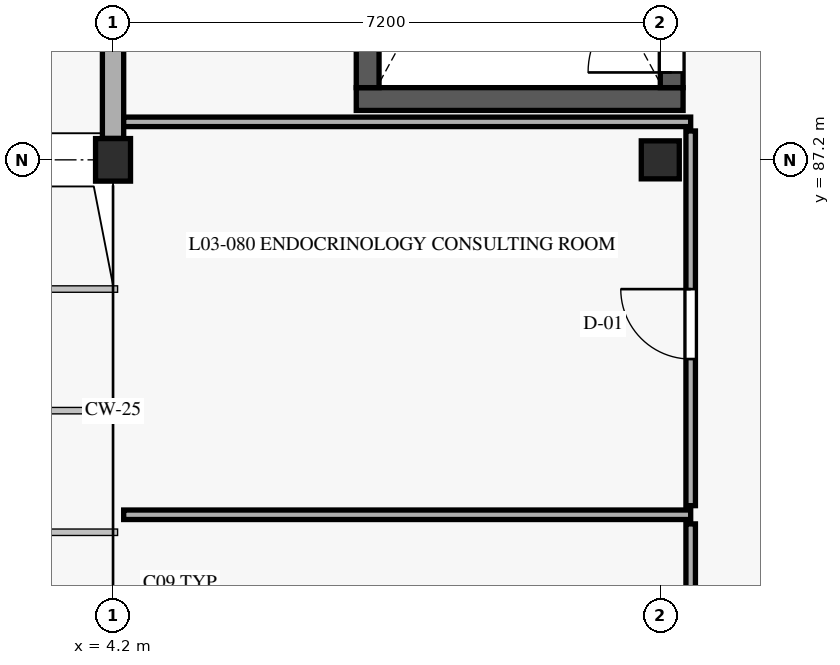
"""IFC4 building model, lengths in metres.
Left out: names, types, materials, properties, quantities, classifications, styles, units other than length and angle.
Written with IfcOpenShell. Run it as: python <this file> out.ifc"""

import sys

from ifc_helpers import new_model, si_unit, direction, frame, frame_2d, origin, origin_with_axes, origin_2d, place, context, subcontext, project, spatial, rectangle, extrude, element, fill, save


model = new_model("IFC4")
c1 = context("Model", 3, precision=1e-05, world=origin(), true_north=direction((0.0, 1.0)))
c2 = subcontext(c1, "Body", "Model", "MODEL_VIEW")
j1 = project(units=[si_unit("LENGTHUNIT", "METRE"), si_unit("PLANEANGLEUNIT", "RADIAN")], contexts=[c1])
p1 = place(None, origin())
s1 = spatial("IfcSite", under=j1, at=p1, CompositionType="ELEMENT")
p2 = place(p1, origin())
s2 = spatial("IfcBuilding", under=s1, at=p2, CompositionType="ELEMENT")
p3 = place(p2, frame((0.0, 0.0, 9.3)))
s3 = spatial("IfcBuildingStorey", under=s2, at=p3, CompositionType="ELEMENT", Elevation=9.3)
p4 = place(p3, frame((4.2, 87.2, 0.0), z_axis=(0.0, 0.0, 1.0), x_axis=(1.0, 0.0, 0.0)))
e1 = element("IfcColumn", 1, at=p4, inside=s3, PredefinedType="COLUMN", context=c2, shape_type="SweptSolid", body=[
    extrude(rectangle(XDim=0.46, YDim=0.56, at=origin_2d()), origin(), (0.0, 0.0, 1.0), 4.2),
])
p5 = place(p3, frame((11.4, 87.2, 0.0), z_axis=(0.0, 0.0, 1.0), x_axis=(1.0, 0.0, 0.0)))
e2 = element("IfcColumn", 2, at=p5, inside=s3, PredefinedType="COLUMN", context=c2, shape_type="SweptSolid", body=[
    extrude(rectangle(XDim=0.5, YDim=0.5, at=origin_2d()), origin(), (0.0, 0.0, 1.0), 4.2),
])
p6 = place(p3, frame((7.4, 88.0, 0.0), z_axis=(0.0, 0.0, 1.0), x_axis=(1.0, 0.0, 0.0)))
e3 = element("IfcWall", 3, at=p6, inside=s3, PredefinedType="SHEAR", context=c2, shape_type="SweptSolid", body=[
    extrude(rectangle(XDim=4.3, YDim=0.3, at=frame_2d((2.15, 0.0))), origin(), (0.0, 0.0, 1.0), 3.9),
])
p7 = place(p3, frame((7.55, 96.85, 0.0), z_axis=(0.0, 0.0, 1.0), x_axis=(0.0, -1.0, 0.0)))
e4 = element("IfcWall", 4, at=p7, inside=s3, PredefinedType="SHEAR", context=c2, shape_type="SweptSolid", body=[
    extrude(rectangle(XDim=8.7, YDim=0.3, at=frame_2d((4.35, 0.0))), origin(), (0.0, 0.0, 1.0), 3.9),
])
p8 = place(p3, frame((11.55, 88.15, 0.0), z_axis=(0.0, 0.0, 1.0), x_axis=(0.0, 1.0, 0.0)))
e5 = element("IfcWall", 5, at=p8, inside=s3, PredefinedType="SHEAR", context=c2, shape_type="SweptSolid", body=[
    extrude(rectangle(XDim=8.7, YDim=0.3, at=frame_2d((4.35, 0.0))), origin(), (0.0, 0.0, 1.0), 3.9),
])
p9 = place(p8, frame((0.2, 0.0, 0.0)))
e6 = element("IfcOpeningElement", 6, at=p9, cuts=e5, PredefinedType="OPENING", context=c2, shape_type="SweptSolid", body=[
    extrude(rectangle(XDim=1.1, YDim=2.2, at=frame_2d((0.55, 1.1))), frame((0.0, 0.16, 0.0), z_axis=(0.0, -1.0, 0.0), x_axis=(1.0, 0.0, 0.0)), (0.0, 0.0, 1.0), 0.32),
])
p10 = place(p8, frame((7.52, 0.0, 0.0)))
e7 = element("IfcOpeningElement", 7, at=p10, cuts=e5, PredefinedType="OPENING", context=c2, shape_type="SweptSolid", body=[
    extrude(rectangle(XDim=0.86, YDim=2.05, at=frame_2d((0.43, 1.025))), frame((0.0, 0.16, 0.0), z_axis=(0.0, -1.0, 0.0), x_axis=(1.0, 0.0, 0.0)), (0.0, 0.0, 1.0), 0.32),
])
p11 = place(p3, frame((4.2, 93.518, 0.0), z_axis=(0.0, 0.0, 1.0), x_axis=(0.0, -1.0, 0.0)))
e8 = element("IfcWall", 8, at=p11, inside=s3, PredefinedType="SOLIDWALL", context=c2, shape_type="SweptSolid", body=[
    extrude(rectangle(XDim=6.036, YDim=0.28, at=frame_2d((3.018, 0.0))), origin(), (0.0, 0.0, 1.0), 3.48),
])
p12 = place(p11, frame((1.362, 0.0, 0.88)))
e9 = element("IfcOpeningElement", 9, at=p12, cuts=e8, PredefinedType="OPENING", context=c2, shape_type="SweptSolid", body=[
    extrude(rectangle(XDim=1.3, YDim=1.7, at=frame_2d((0.65, 0.85))), frame((0.0, 0.15, 0.0), z_axis=(0.0, -1.0, 0.0), x_axis=(1.0, 0.0, 0.0)), (0.0, 0.0, 1.0), 0.3),
])
p13 = place(p11, frame((3.534, 0.0, 0.88)))
e10 = element("IfcOpeningElement", 10, at=p13, cuts=e8, PredefinedType="OPENING", context=c2, shape_type="SweptSolid", body=[
    extrude(rectangle(XDim=0.98, YDim=2.1, at=frame_2d((0.49, 1.05))), frame((0.0, 0.15, 0.0), z_axis=(0.0, -1.0, 0.0), x_axis=(1.0, 0.0, 0.0)), (0.0, 0.0, 1.0), 0.3),
])
p14 = place(p3, frame((11.8, 76.15, 0.0), z_axis=(0.0, 0.0, 1.0), x_axis=(0.0, 1.0, 0.0)))
e11 = element("IfcWall", 11, at=p14, inside=s3, PredefinedType="PARTITIONING", context=c2, shape_type="SweptSolid", body=[
    extrude(rectangle(XDim=6.26, YDim=0.125, at=frame_2d((3.13, 0.0))), origin(), (0.0, 0.0, 1.0), 3.495),
])
p15 = place(p14, frame((2.416, 0.0, 0.0)))
e12 = element("IfcOpeningElement", 12, at=p15, cuts=e11, PredefinedType="OPENING", context=c2, shape_type="SweptSolid", body=[
    extrude(rectangle(XDim=1.12, YDim=2.2, at=frame_2d((0.56, 1.1))), frame((0.0, 0.073, 0.0), z_axis=(0.0, -1.0, 0.0), x_axis=(1.0, 0.0, 0.0)), (0.0, 0.0, 1.0), 0.145),
])
p16 = place(p3, frame((4.34, 82.53, 0.0), z_axis=(0.0, 0.0, 1.0), x_axis=(1.0, 0.0, 0.0)))
e13 = element("IfcWall", 13, at=p16, inside=s3, PredefinedType="PARTITIONING", context=c2, shape_type="SweptSolid", body=[
    extrude(rectangle(XDim=7.46, YDim=0.125, at=frame_2d((3.73, 0.0))), origin(), (0.0, 0.0, 1.0), 3.475),
])
p17 = place(p3, frame((11.8, 82.65, 0.0), z_axis=(0.0, 0.0, 1.0), x_axis=(0.0, 1.0, 0.0)))
e14 = element("IfcWall", 14, at=p17, inside=s3, PredefinedType="PARTITIONING", context=c2, shape_type="SweptSolid", body=[
    extrude(rectangle(XDim=4.93, YDim=0.125, at=frame_2d((2.465, 0.0))), origin(), (0.0, 0.0, 1.0), 3.495),
])
p18 = place(p17, frame((1.929, 0.0, 0.0)))
e15 = element("IfcOpeningElement", 15, at=p18, cuts=e14, PredefinedType="OPENING", context=c2, shape_type="SweptSolid", body=[
    extrude(rectangle(XDim=0.92, YDim=2.15, at=frame_2d((0.46, 1.075))), frame((0.0, 0.073, 0.0), z_axis=(0.0, -1.0, 0.0), x_axis=(1.0, 0.0, 0.0)), (0.0, 0.0, 1.0), 0.145),
])
p19 = place(p3, frame((4.34, 87.7, 0.0), z_axis=(0.0, 0.0, 1.0), x_axis=(1.0, 0.0, 0.0)))
e16 = element("IfcWall", 16, at=p19, inside=s3, PredefinedType="PARTITIONING", context=c2, shape_type="SweptSolid", body=[
    extrude(rectangle(XDim=7.46, YDim=0.125, at=frame_2d((3.73, 0.0))), origin(), (0.0, 0.0, 1.0), 3.475),
])
p20 = place(p9, origin_with_axes())
e17 = element("IfcDoor", 17, at=p20, inside=s3, OperationType="SINGLE_SWING_LEFT", PredefinedType="DOOR", context=c2, shape_type="SweptSolid", body=[
    extrude(rectangle(XDim=1.1, YDim=2.2, at=frame_2d((0.55, 1.1))), frame((0.0, 0.025, 0.0), z_axis=(0.0, -1.0, 0.0), x_axis=(1.0, 0.0, 0.0)), (0.0, 0.0, 1.0), 0.05),
])
fill(e6, e17)
p21 = place(p18, origin_with_axes())
e18 = element("IfcDoor", 18, at=p21, inside=s3, OperationType="SINGLE_SWING_RIGHT", PredefinedType="DOOR", context=c2, shape_type="SweptSolid", body=[
    extrude(rectangle(XDim=0.92, YDim=2.15, at=frame_2d((0.46, 1.075))), frame((0.0, 0.025, 0.0), z_axis=(0.0, -1.0, 0.0), x_axis=(1.0, 0.0, 0.0)), (0.0, 0.0, 1.0), 0.05),
])
fill(e15, e18)
save(model, sys.argv[1])
